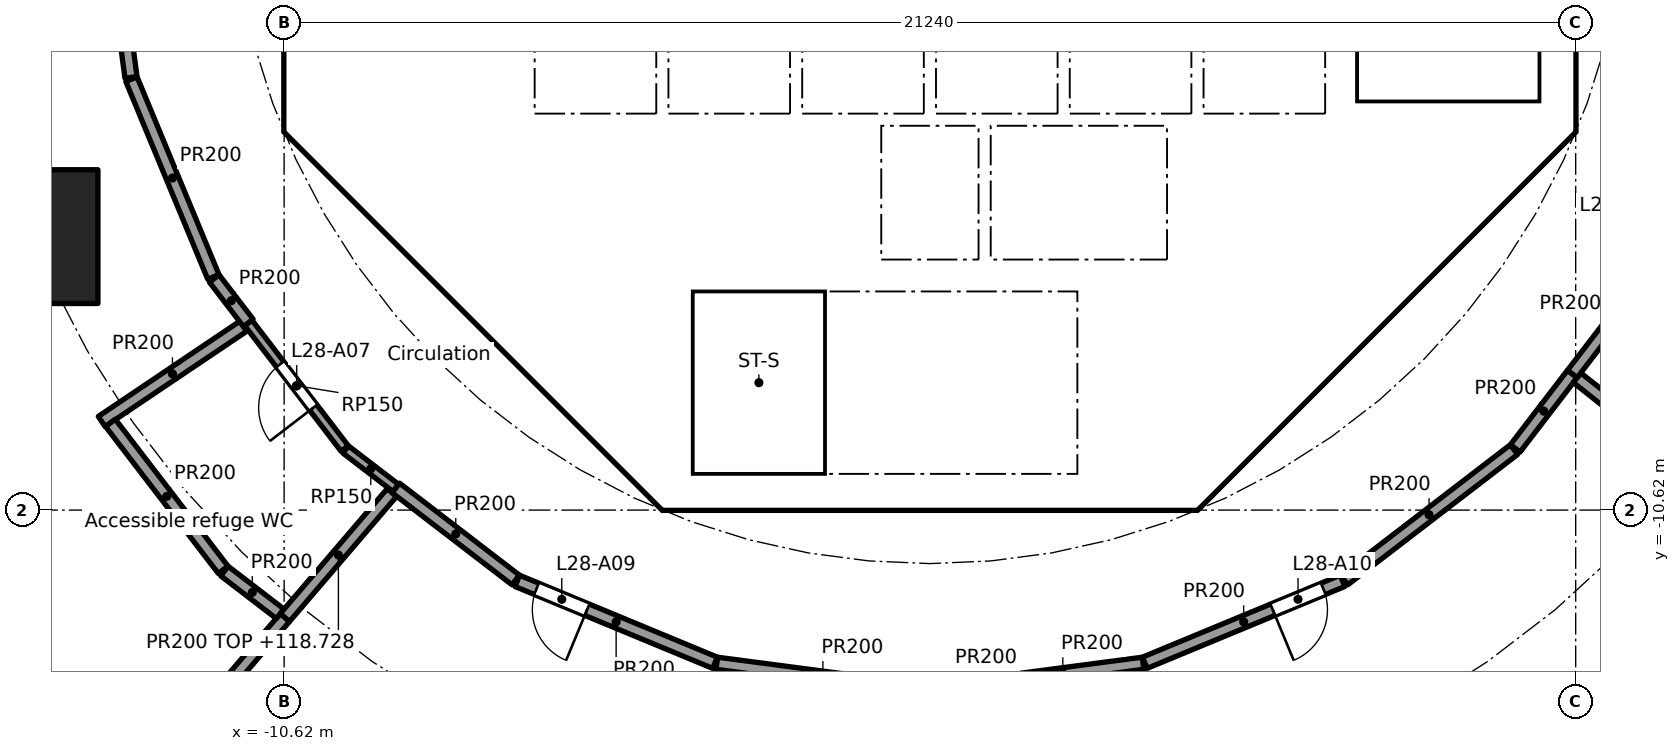
"""IFC4 building model, lengths in metres.
Left out: names, types, materials, properties, quantities, classifications, styles, units other than length and angle.
Written with IfcOpenShell. Run it as: python <this file> out.ifc"""

import sys

from ifc_helpers import new_model, si_unit, direction, frame, frame_2d, origin, origin_2d, place, context, subcontext, project, spatial, polyline, rectangle, outline, extrude, element, fill, save


model = new_model("IFC4")
c1 = context("Model", 3, precision=1e-05, world=origin(), true_north=direction((0.0, 1.0)))
c2 = subcontext(c1, "Body", "Model", "MODEL_VIEW")
j1 = project(units=[si_unit("LENGTHUNIT", "METRE"), si_unit("PLANEANGLEUNIT", "RADIAN")], contexts=[c1])
p1 = place(None, origin())
s1 = spatial("IfcSite", under=j1, at=p1, CompositionType="ELEMENT")
p2 = place(p1, origin())
s2 = spatial("IfcBuilding", under=s1, at=p2, CompositionType="ELEMENT")
p3 = place(p2, frame((0.0, 0.0, 114.0)))
s3 = spatial("IfcBuildingStorey", under=s2, at=p3, CompositionType="ELEMENT", Elevation=114.0)
p4 = place(p3, frame((-14.782, -6.123, 0.0), z_axis=(0.0, 0.0, 1.0), x_axis=(1.0, 0.0, 0.0)))
e1 = element("IfcColumn", 1, at=p4, inside=s3, PredefinedType="COLUMN", context=c2, shape_type="SweptSolid", body=[
    extrude(rectangle(XDim=2.2, YDim=2.2, at=origin_2d()), origin(), (0.0, 0.0, 1.0), 5.6),
])
p5 = place(p3, frame((-10.325, 3.801, 0.0), z_axis=(0.0, 0.0, 1.0), x_axis=(0.0, -1.0, 0.0)))
e2 = element("IfcWall", 2, at=p5, inside=s3, PredefinedType="SHEAR", context=c2, shape_type="SweptSolid", body=[
    extrude(rectangle(XDim=7.602, YDim=0.6, at=frame_2d((3.801, 0.0))), origin(), (0.0, 0.0, 1.0), 5.34),
])
p6 = place(p5, frame((0.651, 0.0, 0.0)))
e3 = element("IfcOpeningElement", 3, at=p6, cuts=e2, PredefinedType="OPENING", context=c2, shape_type="SweptSolid", body=[
    extrude(rectangle(XDim=1.5, YDim=2.1, at=frame_2d((0.75, 1.05))), frame((0.0, 0.31, 0.0), z_axis=(0.0, -1.0, 0.0), x_axis=(1.0, 0.0, 0.0)), (0.0, 0.0, 1.0), 0.62),
])
p7 = place(p5, frame((5.451, 0.0, 0.0)))
e4 = element("IfcOpeningElement", 4, at=p7, cuts=e2, PredefinedType="OPENING", context=c2, shape_type="SweptSolid", body=[
    extrude(rectangle(XDim=1.5, YDim=2.1, at=frame_2d((0.75, 1.05))), frame((0.0, 0.31, 0.0), z_axis=(0.0, -1.0, 0.0), x_axis=(1.0, 0.0, 0.0)), (0.0, 0.0, 1.0), 0.62),
])
p8 = place(p3, frame((-9.988, -4.613, 0.0), z_axis=(0.0, 0.0, 1.0), x_axis=(0.707106781187, -0.707106781187, 0.0)))
e5 = element("IfcWall", 5, at=p8, inside=s3, PredefinedType="SHEAR", context=c2, shape_type="SweptSolid", body=[
    extrude(rectangle(XDim=7.602, YDim=0.6, at=frame_2d((3.801, 0.0))), origin(), (0.0, 0.0, 1.0), 5.34),
])
p9 = place(p8, frame((6.151, 0.0, 0.0)))
e6 = element("IfcOpeningElement", 6, at=p9, cuts=e5, PredefinedType="OPENING", context=c2, shape_type="SweptSolid", body=[
    extrude(rectangle(XDim=1.1, YDim=2.1, at=frame_2d((0.55, 1.05))), frame((0.0, 0.31, 0.0), z_axis=(0.0, -1.0, 0.0), x_axis=(1.0, 0.0, 0.0)), (0.0, 0.0, 1.0), 0.62),
])
p10 = place(p3, frame((4.613, -9.988, 0.0), z_axis=(0.0, 0.0, 1.0), x_axis=(0.707106781187, 0.707106781187, 0.0)))
e7 = element("IfcWall", 7, at=p10, inside=s3, PredefinedType="SHEAR", context=c2, shape_type="SweptSolid", body=[
    extrude(rectangle(XDim=7.602, YDim=0.6, at=frame_2d((3.801, 0.0))), origin(), (0.0, 0.0, 1.0), 5.34),
])
p11 = place(p10, frame((3.201, 0.0, 0.0)))
e8 = element("IfcOpeningElement", 8, at=p11, cuts=e7, PredefinedType="OPENING", context=c2, shape_type="SweptSolid", body=[
    extrude(rectangle(XDim=1.2, YDim=2.1, at=frame_2d((0.6, 1.05))), frame((0.0, 0.31, 0.0), z_axis=(0.0, -1.0, 0.0), x_axis=(1.0, 0.0, 0.0)), (0.0, 0.0, 1.0), 0.62),
])
p12 = place(p3, frame((4.0, -10.025, 0.0), z_axis=(0.0, 0.0, 1.0), x_axis=(0.0, 1.0, 0.0)))
e9 = element("IfcWall", 9, at=p12, inside=s3, PredefinedType="SOLIDWALL", context=c2, shape_type="SweptSolid", body=[
    extrude(rectangle(XDim=3.0, YDim=0.2, at=frame_2d((1.5, 0.0))), origin(), (0.0, 0.0, 1.0), 5.34),
])
p13 = place(p12, frame((0.975, 0.0, 0.0)))
e10 = element("IfcOpeningElement", 10, at=p13, cuts=e9, PredefinedType="OPENING", context=c2, shape_type="SweptSolid", body=[
    extrude(rectangle(XDim=1.1, YDim=2.1, at=frame_2d((0.55, 1.05))), frame((0.0, 0.11, 0.0), z_axis=(0.0, -1.0, 0.0), x_axis=(1.0, 0.0, 0.0)), (0.0, 0.0, 1.0), 0.22),
])
p14 = place(p3, frame((-5.8, -8.227, 0.0), z_axis=(0.0, 0.0, 1.0), x_axis=(0.0, 1.0, 0.0)))
e11 = element("IfcWall", 11, at=p14, inside=s3, PredefinedType="PARTITIONING", context=c2, shape_type="SweptSolid", body=[
    extrude(rectangle(XDim=3.927, YDim=0.15, at=frame_2d((1.963, 0.0))), origin(), (0.0, 0.0, 1.0), 5.34),
])
p15 = place(p14, frame((1.476, 0.0, 0.0)))
e12 = element("IfcOpeningElement", 12, at=p15, cuts=e11, PredefinedType="OPENING", context=c2, shape_type="SweptSolid", body=[
    extrude(rectangle(XDim=0.9, YDim=2.1, at=frame_2d((0.45, 1.05))), frame((0.0, 0.085, 0.0), z_axis=(0.0, -1.0, 0.0), x_axis=(1.0, 0.0, 0.0)), (0.0, 0.0, 1.0), 0.17),
])
p16 = place(p3, frame((4.0, -6.5, 0.0), z_axis=(0.0, 0.0, 1.0), x_axis=(0.0, 1.0, 0.0)))
e13 = element("IfcWall", 13, at=p16, inside=s3, PredefinedType="SOLIDWALL", context=c2, shape_type="SweptSolid", body=[
    extrude(rectangle(XDim=2.2, YDim=0.2, at=frame_2d((1.1, 0.0))), origin(), (0.0, 0.0, 1.0), 5.34),
])
p17 = place(p16, frame((0.55, 0.0, 0.0)))
e14 = element("IfcOpeningElement", 14, at=p17, cuts=e13, PredefinedType="OPENING", context=c2, shape_type="SweptSolid", body=[
    extrude(rectangle(XDim=1.1, YDim=2.1, at=frame_2d((0.55, 1.05))), frame((0.0, 0.11, 0.0), z_axis=(0.0, -1.0, 0.0), x_axis=(1.0, 0.0, 0.0)), (0.0, 0.0, 1.0), 0.22),
])
p18 = place(p3, frame((-4.0, -6.5, 0.0), z_axis=(0.0, 0.0, 1.0), x_axis=(0.0, 1.0, 0.0)))
e15 = element("IfcWall", 15, at=p18, inside=s3, PredefinedType="SOLIDWALL", context=c2, shape_type="SweptSolid", body=[
    extrude(rectangle(XDim=2.2, YDim=0.2, at=frame_2d((1.1, 0.0))), origin(), (0.0, 0.0, 1.0), 5.34),
])
p19 = place(p18, frame((0.65, 0.0, 0.0)))
e16 = element("IfcOpeningElement", 16, at=p19, cuts=e15, PredefinedType="OPENING", context=c2, shape_type="SweptSolid", body=[
    extrude(rectangle(XDim=0.9, YDim=2.1, at=frame_2d((0.45, 1.05))), frame((0.0, 0.11, 0.0), z_axis=(0.0, -1.0, 0.0), x_axis=(1.0, 0.0, 0.0)), (0.0, 0.0, 1.0), 0.22),
])
p20 = place(p3, origin())
e17 = element("IfcWall", 17, at=p20, inside=s3, PredefinedType="SHEAR", context=c2, shape_type="SweptSolid", body=[
    extrude(outline(polyline([(-10.625, -3.801), (-10.025, -3.801), (-10.025, -4.152), (-9.776, -4.401), (-10.2, -4.825), (-10.625, -4.401), (-10.625, -3.801)])), origin(), (0.0, 0.0, 1.0), 5.34),
])
p21 = place(p3, origin())
e18 = element("IfcWall", 18, at=p21, inside=s3, PredefinedType="SHEAR", context=c2, shape_type="SweptSolid", body=[
    extrude(outline(polyline([(-4.152, -10.025), (4.152, -10.025), (4.401, -9.776), (4.825, -10.2), (4.401, -10.625), (-4.401, -10.625), (-4.825, -10.2), (-4.401, -9.776), (-4.152, -10.025)])), origin(), (0.0, 0.0, 1.0), 5.34),
])
p22 = place(p3, origin())
e19 = element("IfcWall", 19, at=p22, inside=s3, PredefinedType="SHEAR", context=c2, shape_type="SweptSolid", body=[
    extrude(outline(polyline([(9.776, -4.401), (10.025, -4.152), (10.025, -3.801), (10.025, 4.152), (9.776, 4.401), (10.2, 4.825), (10.625, 4.401), (10.625, -4.401), (10.2, -4.825), (9.776, -4.401)])), origin(), (0.0, 0.0, 1.0), 5.34),
])
for number, where, z_axis, x_axis in (
    (20, (-0.9, -6.5, 0.0), (0.0, 0.0, 1.0), (0.0, 1.0, 0.0)),
    (21, (0.9, -6.5, 0.0), (0.0, 0.0, 1.0), (0.0, 1.0, 0.0)),
):
    element("IfcWall", number, at=place(p3, frame(where, z_axis=z_axis, x_axis=x_axis)), inside=s3, PredefinedType="SOLIDWALL", context=c2, shape_type="SweptSolid", body=[
        extrude(rectangle(XDim=2.2, YDim=0.2, at=frame_2d((1.1, 0.0))), origin(), (0.0, 0.0, 1.0), 5.34),
    ])
p23 = place(p3, origin())
e22 = element("IfcWall", 22, at=p23, inside=s3, PredefinedType="SOLIDWALL", context=c2, shape_type="SweptSolid", body=[
    extrude(outline(polyline([(-6.7, -2.1), (-6.5, -2.1), (-6.5, -4.1), (-4.5, -4.1), (-4.5, -2.1), (-4.3, -2.1), (-4.3, -4.1), (-2.3, -4.1), (-2.3, -2.1), (-2.1, -2.1), (-2.1, -4.1), (-0.1, -4.1), (-0.1, -2.1), (0.1, -2.1), (0.1, -4.1), (2.1, -4.1), (2.1, -2.1), (2.3, -2.1), (2.3, -4.1), (4.3, -4.1), (4.3, -2.1), (4.5, -2.1), (4.5, -4.1), (6.5, -4.1), (6.5, -2.1), (6.7, -2.1), (6.7, -4.3), (-6.7, -4.3), (-6.7, -2.1)])), origin(), (0.0, 0.0, 1.0), 5.34),
])
p24 = place(p3, frame((-10.025, -4.0, 0.0), z_axis=(0.0, 0.0, 1.0), x_axis=(1.0, 0.0, 0.0)))
e23 = element("IfcWall", 23, at=p24, inside=s3, PredefinedType="PARTITIONING", context=c2, shape_type="SweptSolid", body=[
    extrude(rectangle(XDim=3.325, YDim=0.2, at=frame_2d((1.662, 0.0))), origin(), (0.0, 0.0, 1.0), 5.34),
])
p25 = place(p3, origin())
e24 = element("IfcWall", 24, at=p25, inside=s3, PredefinedType="SOLIDWALL", context=c2, shape_type="SweptSolid", body=[
    extrude(outline(polyline([(-3.9, -10.025), (-4.1, -10.025), (-4.1, -7.025), (-3.9, -7.025), (-3.9, -10.025)])), origin(), (0.0, 0.0, 1.0), 5.34),
])
p26 = place(p3, origin())
e25 = element("IfcWall", 25, at=p26, inside=s3, PredefinedType="SOLIDWALL", context=c2, shape_type="SweptSolid", body=[
    extrude(outline(polyline([(4.1, -7.025), (-4.1, -7.025), (-4.1, -6.5), (4.1, -6.5), (4.1, -7.025)])), origin(), (0.0, 0.0, 1.0), 5.34),
])
p27 = place(p3, origin())
e26 = element("IfcWall", 26, at=p27, inside=s3, PredefinedType="SOLIDWALL", context=c2, shape_type="SweptSolid", body=[
    extrude(outline(polyline([(7.025, -3.9), (6.7, -3.9), (6.7, 3.9), (7.025, 3.9), (7.025, -3.9)])), origin(), (0.0, 0.0, 1.0), 5.34),
])
p28 = place(p3, origin())
e27 = element("IfcWall", 27, at=p28, inside=s3, PredefinedType="SOLIDWALL", context=c2, shape_type="SweptSolid", body=[
    extrude(outline(polyline([(10.025, -4.1), (6.7, -4.1), (6.7, -3.9), (10.025, -3.9), (10.025, -4.1)])), origin(), (0.0, 0.0, 1.0), 5.34),
])
p29 = place(p3, frame((-9.624, -9.607, 0.0), z_axis=(0.0, 0.0, 1.0), x_axis=(-0.608709012517, 0.793393558129, 0.0)))
e28 = element("IfcWall", 28, at=p29, inside=s3, PredefinedType="PARTITIONING", context=c2, shape_type="SweptSolid", body=[
    extrude(rectangle(XDim=2.604, YDim=0.15, at=frame_2d((1.302, 0.0))), origin(), (0.0, 0.0, 1.0), 5.34),
])
p30 = place(p29, frame((0.846, 0.0, 0.0)))
e29 = element("IfcOpeningElement", 29, at=p30, cuts=e28, PredefinedType="OPENING", context=c2, shape_type="SweptSolid", body=[
    extrude(rectangle(XDim=0.9, YDim=2.1, at=frame_2d((0.45, 1.05))), frame((0.0, 0.085, 0.0), z_axis=(0.0, -1.0, 0.0), x_axis=(1.0, 0.0, 0.0)), (0.0, 0.0, 1.0), 0.17),
])
p31 = place(p3, frame((-8.783, -10.257, 0.0), z_axis=(0.0, 0.0, 1.0), x_axis=(-0.793296129213, 0.608835980684, 0.0)))
e30 = element("IfcWall", 30, at=p31, inside=s3, PredefinedType="PARTITIONING", context=c2, shape_type="SweptSolid", body=[
    extrude(rectangle(XDim=1.039, YDim=0.15, at=frame_2d((0.52, 0.0))), origin(), (0.0, 0.0, 1.0), 5.34),
])
p32 = place(p3, frame((-13.62, -9.163, 0.0), z_axis=(0.0, 0.0, 1.0), x_axis=(0.829713316312, 0.558189764089, 0.0)))
e31 = element("IfcWall", 31, at=p32, inside=s3, PredefinedType="PARTITIONING", context=c2, shape_type="SweptSolid", body=[
    extrude(rectangle(XDim=2.805, YDim=0.2, at=frame_2d((1.403, 0.0))), origin(), (0.0, 0.0, 1.0), 5.34),
])
p33 = place(p3, frame((-13.139, -3.505, 0.0), z_axis=(0.0, 0.0, 1.0), x_axis=(-0.130508241489, 0.991447224467, 0.0)))
e32 = element("IfcWall", 32, at=p33, inside=s3, PredefinedType="PARTITIONING", context=c2, shape_type="SweptSolid", body=[
    extrude(rectangle(XDim=2.821, YDim=0.2, at=frame_2d((1.411, 0.0))), origin(), (0.0, 0.0, 1.0), 5.34),
])
p34 = place(p33, frame((0.803, 0.0, 0.0)))
e33 = element("IfcOpeningElement", 33, at=p34, cuts=e32, PredefinedType="OPENING", context=c2, shape_type="SweptSolid", body=[
    extrude(rectangle(XDim=1.2, YDim=2.1, at=frame_2d((0.6, 1.05))), frame((0.0, 0.11, 0.0), z_axis=(0.0, -1.0, 0.0), x_axis=(1.0, 0.0, 0.0)), (0.0, 0.0, 1.0), 0.22),
])
p35 = place(p3, frame((-11.784, -6.786, 0.0), z_axis=(0.0, 0.0, 1.0), x_axis=(-0.382723413813, 0.92386297064, 0.0)))
e34 = element("IfcWall", 34, at=p35, inside=s3, PredefinedType="PARTITIONING", context=c2, shape_type="SweptSolid", body=[
    extrude(rectangle(XDim=3.52, YDim=0.2, at=frame_2d((1.76, 0.0))), origin(), (0.0, 0.0, 1.0), 5.34),
])
p36 = place(p3, frame((-11.623, -11.602, 0.0), z_axis=(0.0, 0.0, 1.0), x_axis=(-0.608791787862, 0.793330044201, 0.0)))
e35 = element("IfcWall", 35, at=p36, inside=s3, PredefinedType="PARTITIONING", context=c2, shape_type="SweptSolid", body=[
    extrude(rectangle(XDim=3.044, YDim=0.2, at=frame_2d((1.522, 0.0))), origin(), (0.0, 0.0, 1.0), 5.34),
])
p37 = place(p3, frame((-11.209, -7.541, 0.0), z_axis=(0.0, 0.0, 1.0), x_axis=(-0.608721561765, 0.793383929912, 0.0)))
e36 = element("IfcWall", 36, at=p37, inside=s3, PredefinedType="PARTITIONING", context=c2, shape_type="SweptSolid", body=[
    extrude(rectangle(XDim=0.919, YDim=0.2, at=frame_2d((0.459, 0.0))), origin(), (0.0, 0.0, 1.0), 5.34),
])
p38 = place(p3, frame((-10.607, -12.386, 0.0), z_axis=(0.0, 0.0, 1.0), x_axis=(-0.650437966539, -0.75955937996, 0.0)))
e37 = element("IfcWall", 37, at=p38, inside=s3, PredefinedType="PARTITIONING", context=c2, shape_type="SweptSolid", body=[
    extrude(rectangle(XDim=12.348, YDim=0.2, at=frame_2d((6.174, 0.0))), origin(), (0.0, 0.0, 1.0), 4.728),
])
p39 = place(p3, frame((-10.686, -12.325, 0.0), z_axis=(0.0, 0.0, 1.0), x_axis=(-0.793299821517, 0.608831169687, 0.0)))
e38 = element("IfcWall", 38, at=p39, inside=s3, PredefinedType="PARTITIONING", context=c2, shape_type="SweptSolid", body=[
    extrude(rectangle(XDim=1.154, YDim=0.2, at=frame_2d((0.577, 0.0))), origin(), (0.0, 0.0, 1.0), 5.34),
])
p40 = place(p3, frame((-8.848, -10.333, 0.0), z_axis=(0.0, 0.0, 1.0), x_axis=(-0.650412043265, -0.759581578223, 0.0)))
e39 = element("IfcWall", 39, at=p40, inside=s3, PredefinedType="PARTITIONING", context=c2, shape_type="SweptSolid", body=[
    extrude(rectangle(XDim=2.704, YDim=0.2, at=frame_2d((1.352, 0.0))), origin(), (0.0, 0.0, 1.0), 4.728),
])
p41 = place(p3, frame((-6.812, -11.769, 0.0), z_axis=(0.0, 0.0, 1.0), x_axis=(-0.793430741124, 0.608660545, 0.0)))
e40 = element("IfcWall", 40, at=p41, inside=s3, PredefinedType="PARTITIONING", context=c2, shape_type="SweptSolid", body=[
    extrude(rectangle(XDim=2.484, YDim=0.2, at=frame_2d((1.242, 0.0))), origin(), (0.0, 0.0, 1.0), 5.34),
])
p42 = place(p3, frame((-3.534, -13.131, 0.0), z_axis=(0.0, 0.0, 1.0), x_axis=(-0.92386297064, 0.382723413813, 0.0)))
e41 = element("IfcWall", 41, at=p42, inside=s3, PredefinedType="PARTITIONING", context=c2, shape_type="SweptSolid", body=[
    extrude(rectangle(XDim=3.52, YDim=0.2, at=frame_2d((1.76, 0.0))), origin(), (0.0, 0.0, 1.0), 5.34),
])
p43 = place(p42, frame((2.278, 0.0, 0.0)))
e42 = element("IfcOpeningElement", 42, at=p43, cuts=e41, PredefinedType="OPENING", context=c2, shape_type="SweptSolid", body=[
    extrude(rectangle(XDim=0.9, YDim=2.1, at=frame_2d((0.45, 1.05))), frame((0.0, 0.11, 0.0), z_axis=(0.0, -1.0, 0.0), x_axis=(1.0, 0.0, 0.0)), (0.0, 0.0, 1.0), 0.22),
])
p44 = place(p3, frame((-0.015, -13.598, 0.0), z_axis=(0.0, 0.0, 1.0), x_axis=(-0.991452406768, 0.130468866457, 0.0)))
e43 = element("IfcWall", 43, at=p44, inside=s3, PredefinedType="PARTITIONING", context=c2, shape_type="SweptSolid", body=[
    extrude(rectangle(XDim=3.52, YDim=0.2, at=frame_2d((1.76, 0.0))), origin(), (0.0, 0.0, 1.0), 5.34),
])
p45 = place(p3, frame((3.505, -13.139, 0.0), z_axis=(0.0, 0.0, 1.0), x_axis=(-0.99145398328, -0.130456885743, 0.0)))
e44 = element("IfcWall", 44, at=p45, inside=s3, PredefinedType="PARTITIONING", context=c2, shape_type="SweptSolid", body=[
    extrude(rectangle(XDim=2.661, YDim=0.2, at=frame_2d((1.331, 0.0))), origin(), (0.0, 0.0, 1.0), 5.34),
])
p46 = place(p3, frame((6.786, -11.784, 0.0), z_axis=(0.0, 0.0, 1.0), x_axis=(-0.92386297064, -0.382723413813, 0.0)))
e45 = element("IfcWall", 45, at=p46, inside=s3, PredefinedType="PARTITIONING", context=c2, shape_type="SweptSolid", body=[
    extrude(rectangle(XDim=3.52, YDim=0.2, at=frame_2d((1.76, 0.0))), origin(), (0.0, 0.0, 1.0), 5.34),
])
p47 = place(p46, frame((0.342, 0.0, 0.0)))
e46 = element("IfcOpeningElement", 46, at=p47, cuts=e45, PredefinedType="OPENING", context=c2, shape_type="SweptSolid", body=[
    extrude(rectangle(XDim=0.9, YDim=2.1, at=frame_2d((0.45, 1.05))), frame((0.0, 0.11, 0.0), z_axis=(0.0, -1.0, 0.0), x_axis=(1.0, 0.0, 0.0)), (0.0, 0.0, 1.0), 0.22),
])
p48 = place(p3, frame((9.605, -9.626, 0.0), z_axis=(0.0, 0.0, 1.0), x_axis=(-0.793402024283, -0.608697977542, 0.0)))
e47 = element("IfcWall", 47, at=p48, inside=s3, PredefinedType="PARTITIONING", context=c2, shape_type="SweptSolid", body=[
    extrude(rectangle(XDim=3.52, YDim=0.2, at=frame_2d((1.76, 0.0))), origin(), (0.0, 0.0, 1.0), 5.34),
])
p49 = place(p3, frame((10.565, -8.381, 0.0), z_axis=(0.0, 0.0, 1.0), x_axis=(-0.608753901718, -0.793359116128, 0.0)))
e48 = element("IfcWall", 48, at=p49, inside=s3, PredefinedType="PARTITIONING", context=c2, shape_type="SweptSolid", body=[
    extrude(rectangle(XDim=1.542, YDim=0.2, at=frame_2d((0.771, 0.0))), origin(), (0.0, 0.0, 1.0), 5.34),
])
p50 = place(p3, frame((10.643, -8.443, 0.0), z_axis=(0.0, 0.0, 1.0), x_axis=(0.783408548954, -0.621507075926, 0.0)))
e49 = element("IfcWall", 49, at=p50, inside=s3, PredefinedType="PARTITIONING", context=c2, shape_type="SweptSolid", body=[
    extrude(rectangle(XDim=12.095, YDim=0.2, at=frame_2d((6.048, 0.0))), origin(), (0.0, 0.0, 1.0), 5.34),
])
p51 = place(p3, frame((11.769, -6.812, 0.0), z_axis=(0.0, 0.0, 1.0), x_axis=(-0.608654375099, -0.793435474171, 0.0)))
e50 = element("IfcWall", 50, at=p51, inside=s3, PredefinedType="PARTITIONING", context=c2, shape_type="SweptSolid", body=[
    extrude(rectangle(XDim=1.978, YDim=0.2, at=frame_2d((0.989, 0.0))), origin(), (0.0, 0.0, 1.0), 5.34),
])
p52 = place(p17, origin())
e51 = element("IfcDoor", 51, at=p52, inside=s3, OperationType="DOUBLE_DOOR_SLIDING", PredefinedType="DOOR", context=c2, shape_type="SweptSolid", body=[
    extrude(rectangle(XDim=1.1, YDim=2.1, at=frame_2d((0.55, 1.05))), frame((0.0, 0.025, 0.0), z_axis=(0.0, -1.0, 0.0), x_axis=(1.0, 0.0, 0.0)), (0.0, 0.0, 1.0), 0.05),
])
fill(e14, e51)
p53 = place(p13, origin())
e52 = element("IfcDoor", 52, at=p53, inside=s3, OperationType="SINGLE_SWING_RIGHT", PredefinedType="DOOR", context=c2, shape_type="SweptSolid", body=[
    extrude(rectangle(XDim=1.1, YDim=2.1, at=frame_2d((0.55, 1.05))), frame((0.0, 0.025, 0.0), z_axis=(0.0, -1.0, 0.0), x_axis=(1.0, 0.0, 0.0)), (0.0, 0.0, 1.0), 0.05),
])
fill(e10, e52)
p54 = place(p15, origin())
e53 = element("IfcDoor", 53, at=p54, inside=s3, OperationType="SINGLE_SWING_RIGHT", PredefinedType="DOOR", context=c2, shape_type="SweptSolid", body=[
    extrude(rectangle(XDim=0.9, YDim=2.1, at=frame_2d((0.45, 1.05))), frame((0.0, 0.025, 0.0), z_axis=(0.0, -1.0, 0.0), x_axis=(1.0, 0.0, 0.0)), (0.0, 0.0, 1.0), 0.05),
])
fill(e12, e53)
p55 = place(p19, frame((0.9, 0.0, 0.0), x_axis=(-1.0, 0.0, 0.0)))
e54 = element("IfcDoor", 54, at=p55, inside=s3, OperationType="SINGLE_SWING_LEFT", PredefinedType="DOOR", context=c2, shape_type="SweptSolid", body=[
    extrude(rectangle(XDim=0.9, YDim=2.1, at=frame_2d((0.45, 1.05))), frame((0.0, 0.025, 0.0), z_axis=(0.0, -1.0, 0.0), x_axis=(1.0, 0.0, 0.0)), (0.0, 0.0, 1.0), 0.05),
])
fill(e16, e54)
p56 = place(p11, origin())
e55 = element("IfcDoor", 55, at=p56, inside=s3, OperationType="SINGLE_SWING_RIGHT", PredefinedType="DOOR", context=c2, shape_type="SweptSolid", body=[
    extrude(rectangle(XDim=1.2, YDim=2.1, at=frame_2d((0.6, 1.05))), frame((0.0, 0.025, 0.0), z_axis=(0.0, -1.0, 0.0), x_axis=(1.0, 0.0, 0.0)), (0.0, 0.0, 1.0), 0.05),
])
fill(e8, e55)
p57 = place(p7, origin())
e56 = element("IfcDoor", 56, at=p57, inside=s3, OperationType="DOUBLE_DOOR_SINGLE_SWING", PredefinedType="DOOR", context=c2, shape_type="SweptSolid", body=[
    extrude(rectangle(XDim=1.5, YDim=2.1, at=frame_2d((0.75, 1.05))), frame((0.0, 0.025, 0.0), z_axis=(0.0, -1.0, 0.0), x_axis=(1.0, 0.0, 0.0)), (0.0, 0.0, 1.0), 0.05),
])
fill(e4, e56)
p58 = place(p9, origin())
e57 = element("IfcDoor", 57, at=p58, inside=s3, OperationType="SINGLE_SWING_RIGHT", PredefinedType="DOOR", context=c2, shape_type="SweptSolid", body=[
    extrude(rectangle(XDim=1.1, YDim=2.1, at=frame_2d((0.55, 1.05))), frame((0.0, 0.025, 0.0), z_axis=(0.0, -1.0, 0.0), x_axis=(1.0, 0.0, 0.0)), (0.0, 0.0, 1.0), 0.05),
])
fill(e6, e57)
p59 = place(p30, origin())
e58 = element("IfcDoor", 58, at=p59, inside=s3, OperationType="SINGLE_SWING_LEFT", PredefinedType="DOOR", context=c2, shape_type="SweptSolid", body=[
    extrude(rectangle(XDim=0.9, YDim=2.1, at=frame_2d((0.45, 1.05))), frame((0.0, 0.025, 0.0), z_axis=(0.0, -1.0, 0.0), x_axis=(1.0, 0.0, 0.0)), (0.0, 0.0, 1.0), 0.05),
])
fill(e29, e58)
p60 = place(p43, origin())
e59 = element("IfcDoor", 59, at=p60, inside=s3, OperationType="SINGLE_SWING_LEFT", PredefinedType="DOOR", context=c2, shape_type="SweptSolid", body=[
    extrude(rectangle(XDim=0.9, YDim=2.1, at=frame_2d((0.45, 1.05))), frame((0.0, 0.025, 0.0), z_axis=(0.0, -1.0, 0.0), x_axis=(1.0, 0.0, 0.0)), (0.0, 0.0, 1.0), 0.05),
])
fill(e42, e59)
p61 = place(p47, origin())
e60 = element("IfcDoor", 60, at=p61, inside=s3, OperationType="SINGLE_SWING_RIGHT", PredefinedType="DOOR", context=c2, shape_type="SweptSolid", body=[
    extrude(rectangle(XDim=0.9, YDim=2.1, at=frame_2d((0.45, 1.05))), frame((0.0, 0.025, 0.0), z_axis=(0.0, -1.0, 0.0), x_axis=(1.0, 0.0, 0.0)), (0.0, 0.0, 1.0), 0.05),
])
fill(e46, e60)
save(model, sys.argv[1])
